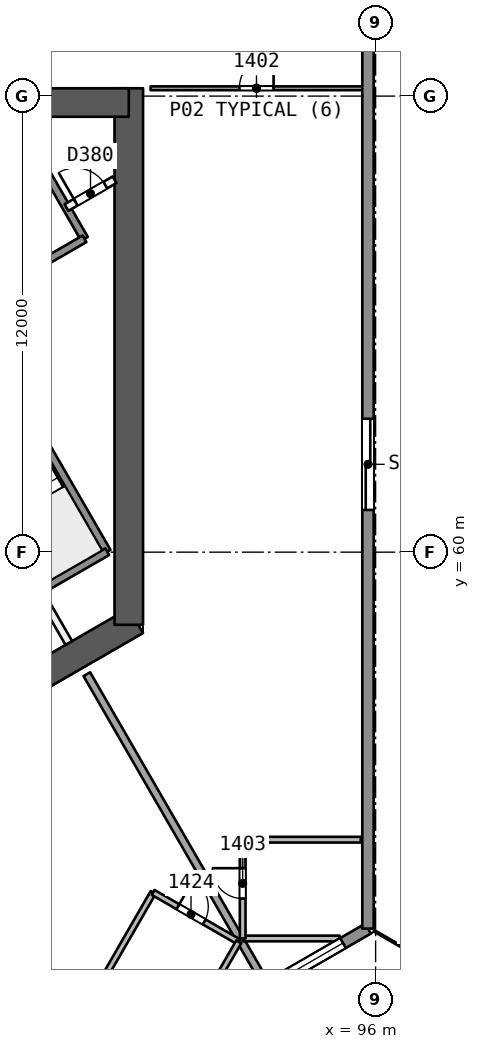
"""IFC4 building model, lengths in metres.
Left out: names, types, materials, properties, quantities, classifications, styles, units other than length and angle.
Written with IfcOpenShell. Run it as: python <this file> out.ifc"""

import sys

from ifc_helpers import new_model, si_unit, direction, frame, frame_2d, origin, place, context, subcontext, project, spatial, rectangle, extrude, element, fill, save


model = new_model("IFC4")
c1 = context("Model", 3, precision=1e-05, world=origin(), true_north=direction((0.0, 1.0)))
c2 = subcontext(c1, "Body", "Model", "MODEL_VIEW")
j1 = project(units=[si_unit("LENGTHUNIT", "METRE"), si_unit("PLANEANGLEUNIT", "RADIAN")], contexts=[c1])
p1 = place(None, origin())
s1 = spatial("IfcSite", under=j1, at=p1, CompositionType="ELEMENT")
p2 = place(p1, origin())
s2 = spatial("IfcBuilding", under=s1, at=p2, CompositionType="ELEMENT")
p3 = place(p2, frame((0.0, 0.0, 64.7)))
s3 = spatial("IfcBuildingStorey", under=s2, at=p3, CompositionType="ELEMENT", Elevation=64.7)
p4 = place(p3, frame((86.723, 56.483, 0.0), z_axis=(0.0, 0.0, 1.0), x_axis=(0.866017201164, 0.500014207086, 0.0)))
e1 = element("IfcWall", 1, at=p4, inside=s3, PredefinedType="SHEAR", context=c2, shape_type="SweptSolid", body=[
    extrude(rectangle(XDim=3.429, YDim=0.75, at=frame_2d((1.714, 0.0))), origin(), (0.0, 0.0, 1.0), 3.7),
])
p5 = place(p3, frame((89.505, 58.089, 0.0), z_axis=(0.0, 0.0, 1.0), x_axis=(0.0, 1.0, 0.0)))
e2 = element("IfcWall", 2, at=p5, inside=s3, PredefinedType="SHEAR", context=c2, shape_type="SweptSolid", body=[
    extrude(rectangle(XDim=14.117, YDim=0.75, at=frame_2d((7.059, 0.0))), origin(), (0.0, 0.0, 1.0), 3.7),
])
p6 = place(p3, frame((89.505, 71.831, 0.0), z_axis=(0.0, 0.0, 1.0), x_axis=(-1.0, 0.0, 0.0)))
e3 = element("IfcWall", 3, at=p6, inside=s3, PredefinedType="SHEAR", context=c2, shape_type="SweptSolid", body=[
    extrude(rectangle(XDim=10.005, YDim=0.75, at=frame_2d((5.002, 0.0))), origin(), (0.0, 0.0, 1.0), 3.7),
])
p7 = place(p6, frame((7.855, 0.0, 0.0)))
e4 = element("IfcOpeningElement", 4, at=p7, cuts=e3, PredefinedType="OPENING", context=c2, shape_type="SweptSolid", body=[
    extrude(rectangle(XDim=1.2, YDim=2.1, at=frame_2d((0.6, 1.05))), frame((0.0, 0.385, 0.0), z_axis=(0.0, -1.0, 0.0), x_axis=(1.0, 0.0, 0.0)), (0.0, 0.0, 1.0), 0.771),
])
p8 = place(p3, frame((90.079, 72.206, 0.0), z_axis=(0.0, 0.0, 1.0), x_axis=(1.0, 0.0, 0.0)))
e5 = element("IfcWall", 5, at=p8, inside=s3, PredefinedType="PARTITIONING", context=c2, shape_type="SweptSolid", body=[
    extrude(rectangle(XDim=5.571, YDim=0.1, at=frame_2d((2.786, 0.0))), origin(), (0.0, 0.0, 1.0), 3.2),
])
p9 = place(p8, frame((2.336, 0.0, 0.0)))
e6 = element("IfcOpeningElement", 6, at=p9, cuts=e5, PredefinedType="OPENING", context=c2, shape_type="SweptSolid", body=[
    extrude(rectangle(XDim=0.9, YDim=2.1, at=frame_2d((0.45, 1.05))), frame((0.0, 0.061, 0.0), z_axis=(0.0, -1.0, 0.0), x_axis=(1.0, 0.0, 0.0)), (0.0, 0.0, 1.0), 0.121),
])
p10 = place(p3, frame((95.051, 49.835, 0.0), z_axis=(0.0, 0.0, 1.0), x_axis=(-1.0, 0.0, 0.0)))
e7 = element("IfcWall", 7, at=p10, inside=s3, PredefinedType="PARTITIONING", context=c2, shape_type="SweptSolid", body=[
    extrude(rectangle(XDim=2.55, YDim=0.15, at=frame_2d((1.275, 0.0))), origin(), (0.0, 0.0, 1.0), 3.2),
])
p11 = place(p3, frame((92.501, 49.835, 0.0), z_axis=(0.0, 0.0, 1.0), x_axis=(0.0, 1.0, 0.0)))
e8 = element("IfcWall", 8, at=p11, inside=s3, PredefinedType="PARTITIONING", context=c2, shape_type="SweptSolid", body=[
    extrude(rectangle(XDim=2.6, YDim=0.15, at=frame_2d((1.3, 0.0))), origin(), (0.0, 0.0, 1.0), 3.2),
])
p12 = place(p11, frame((1.05, 0.0, 0.0)))
e9 = element("IfcOpeningElement", 9, at=p12, cuts=e8, PredefinedType="OPENING", context=c2, shape_type="SweptSolid", body=[
    extrude(rectangle(XDim=0.8, YDim=2.1, at=frame_2d((0.4, 1.05))), frame((0.0, 0.085, 0.0), z_axis=(0.0, -1.0, 0.0), x_axis=(1.0, 0.0, 0.0)), (0.0, 0.0, 1.0), 0.171),
])
p13 = place(p3, frame((92.501, 52.435, 0.0), z_axis=(0.0, 0.0, 1.0), x_axis=(1.0, 0.0, 0.0)))
e10 = element("IfcWall", 10, at=p13, inside=s3, PredefinedType="PARTITIONING", context=c2, shape_type="SweptSolid", body=[
    extrude(rectangle(XDim=3.108, YDim=0.15, at=frame_2d((1.554, 0.0))), origin(), (0.0, 0.0, 1.0), 3.2),
])
p14 = place(p3, frame((88.401, 56.789, 0.0), z_axis=(0.0, 0.0, 1.0), x_axis=(0.49998471623, -0.866034227694, 0.0)))
e11 = element("IfcWall", 11, at=p14, inside=s3, PredefinedType="PARTITIONING", context=c2, shape_type="SweptSolid", body=[
    extrude(rectangle(XDim=9.347, YDim=0.2, at=frame_2d((4.674, 0.0))), origin(), (0.0, 0.0, 1.0), 3.2),
])
p15 = place(p3, frame((88.593, 48.354, 0.0), z_axis=(0.0, 0.0, 1.0), x_axis=(0.499983108224, 0.866035156036, 0.0)))
e12 = element("IfcWall", 12, at=p15, inside=s3, PredefinedType="PARTITIONING", context=c2, shape_type="SweptSolid", body=[
    extrude(rectangle(XDim=3.108, YDim=0.15, at=frame_2d((1.554, 0.0))), origin(), (0.0, 0.0, 1.0), 3.2),
])
p16 = place(p3, frame((90.146, 51.046, 0.0), z_axis=(0.0, 0.0, 1.0), x_axis=(0.866021400173, -0.500006934395, 0.0)))
e13 = element("IfcWall", 13, at=p16, inside=s3, PredefinedType="PARTITIONING", context=c2, shape_type="SweptSolid", body=[
    extrude(rectangle(XDim=2.6, YDim=0.15, at=frame_2d((1.3, 0.0))), origin(), (0.0, 0.0, 1.0), 3.2),
])
p17 = place(p16, frame((0.75, 0.0, 0.0)))
e14 = element("IfcOpeningElement", 14, at=p17, cuts=e13, PredefinedType="OPENING", context=c2, shape_type="SweptSolid", body=[
    extrude(rectangle(XDim=0.8, YDim=2.1, at=frame_2d((0.4, 1.05))), frame((0.0, 0.085, 0.0), z_axis=(0.0, -1.0, 0.0), x_axis=(1.0, 0.0, 0.0)), (0.0, 0.0, 1.0), 0.171),
])
p18 = place(p3, frame((92.398, 49.746, 0.0), z_axis=(0.0, 0.0, 1.0), x_axis=(-0.500015568388, -0.866016415185, 0.0)))
e15 = element("IfcWall", 15, at=p18, inside=s3, PredefinedType="PARTITIONING", context=c2, shape_type="SweptSolid", body=[
    extrude(rectangle(XDim=2.5, YDim=0.15, at=frame_2d((1.25, 0.0))), origin(), (0.0, 0.0, 1.0), 3.2),
])
p19 = place(p3, frame((95.8, 50.095, 0.0), z_axis=(0.0, 0.0, 1.0), x_axis=(-0.866022842194, -0.500004436779, 0.0)))
e16 = element("IfcWall", 16, at=p19, inside=s3, PredefinedType="SOLIDWALL", context=c2, shape_type="SweptSolid", body=[
    extrude(rectangle(XDim=6.121, YDim=0.3, at=frame_2d((3.06, 0.0))), origin(), (0.0, 0.0, 1.0), 3.2),
])
p20 = place(p19, frame((0.76, 0.0, 0.9)))
e17 = element("IfcOpeningElement", 17, at=p20, cuts=e16, PredefinedType="OPENING", context=c2, shape_type="SweptSolid", body=[
    extrude(rectangle(XDim=1.8, YDim=1.5, at=frame_2d((0.9, 0.75))), frame((0.0, 0.161, 0.0), z_axis=(0.0, -1.0, 0.0), x_axis=(1.0, 0.0, 0.0)), (0.0, 0.0, 1.0), 0.321),
])
p21 = place(p19, frame((3.532, 0.0, 0.9)))
e18 = element("IfcOpeningElement", 18, at=p21, cuts=e16, PredefinedType="OPENING", context=c2, shape_type="SweptSolid", body=[
    extrude(rectangle(XDim=1.8, YDim=1.5, at=frame_2d((0.9, 0.75))), frame((0.0, 0.161, 0.0), z_axis=(0.0, -1.0, 0.0), x_axis=(1.0, 0.0, 0.0)), (0.0, 0.0, 1.0), 0.321),
])
p22 = place(p3, frame((95.8, 109.905, 0.0), z_axis=(0.0, 0.0, 1.0), x_axis=(0.0, -1.0, 0.0)))
e19 = element("IfcWall", 19, at=p22, inside=s3, PredefinedType="SOLIDWALL", context=c2, shape_type="SweptSolid", body=[
    extrude(rectangle(XDim=59.811, YDim=0.3, at=frame_2d((29.905, 0.0))), origin(), (0.0, 0.0, 1.0), 3.2),
])
p23 = place(p22, frame((28.394, 0.0, 0.0)))
e20 = element("IfcOpeningElement", 20, at=p23, cuts=e19, PredefinedType="OPENING", context=c2, shape_type="SweptSolid", body=[
    extrude(rectangle(XDim=2.4, YDim=2.4, at=frame_2d((1.2, 1.2))), frame((0.0, 0.161, 0.0), z_axis=(0.0, -1.0, 0.0), x_axis=(1.0, 0.0, 0.0)), (0.0, 0.0, 1.0), 0.321),
])
p24 = place(p22, frame((34.161, 0.0, 0.0)))
e21 = element("IfcOpeningElement", 21, at=p24, cuts=e19, PredefinedType="OPENING", context=c2, shape_type="SweptSolid", body=[
    extrude(rectangle(XDim=2.4, YDim=2.4, at=frame_2d((1.2, 1.2))), frame((0.0, 0.161, 0.0), z_axis=(0.0, -1.0, 0.0), x_axis=(1.0, 0.0, 0.0)), (0.0, 0.0, 1.0), 0.321),
])
p25 = place(p22, frame((46.394, 0.0, 0.0)))
e22 = element("IfcOpeningElement", 22, at=p25, cuts=e19, PredefinedType="OPENING", context=c2, shape_type="SweptSolid", body=[
    extrude(rectangle(XDim=2.4, YDim=2.4, at=frame_2d((1.2, 1.2))), frame((0.0, 0.161, 0.0), z_axis=(0.0, -1.0, 0.0), x_axis=(1.0, 0.0, 0.0)), (0.0, 0.0, 1.0), 0.321),
])
p26 = place(p22, frame((22.938, 0.0, 0.0)))
e23 = element("IfcOpeningElement", 23, at=p26, cuts=e19, PredefinedType="OPENING", context=c2, shape_type="SweptSolid", body=[
    extrude(rectangle(XDim=2.4, YDim=2.4, at=frame_2d((1.2, 1.2))), frame((0.0, 0.161, 0.0), z_axis=(0.0, -1.0, 0.0), x_axis=(1.0, 0.0, 0.0)), (0.0, 0.0, 1.0), 0.321),
])
p27 = place(p22, frame((11.002, 0.0, 0.0)))
e24 = element("IfcOpeningElement", 24, at=p27, cuts=e19, PredefinedType="OPENING", context=c2, shape_type="SweptSolid", body=[
    extrude(rectangle(XDim=2.4, YDim=2.4, at=frame_2d((1.2, 1.2))), frame((0.0, 0.161, 0.0), z_axis=(0.0, -1.0, 0.0), x_axis=(1.0, 0.0, 0.0)), (0.0, 0.0, 1.0), 0.321),
])
p28 = place(p3, frame((90.499, 47.034, 0.0), z_axis=(0.0, 0.0, 1.0), x_axis=(-0.866026049211, 0.499998882086, 0.0)))
e25 = element("IfcWall", 25, at=p28, inside=s3, PredefinedType="SOLIDWALL", context=c2, shape_type="SweptSolid", body=[
    extrude(rectangle(XDim=59.811, YDim=0.3, at=frame_2d((29.905, 0.0))), origin(), (0.0, 0.0, 1.0), 3.2),
])
p29 = place(p28, frame((28.705, 0.0, 0.0)))
e26 = element("IfcOpeningElement", 26, at=p29, cuts=e25, PredefinedType="OPENING", context=c2, shape_type="SweptSolid", body=[
    extrude(rectangle(XDim=2.4, YDim=2.4, at=frame_2d((1.2, 1.2))), frame((0.0, 0.161, 0.0), z_axis=(0.0, -1.0, 0.0), x_axis=(1.0, 0.0, 0.0)), (0.0, 0.0, 1.0), 0.321),
])
p30 = place(p28, frame((34.161, 0.0, 0.0)))
e27 = element("IfcOpeningElement", 27, at=p30, cuts=e25, PredefinedType="OPENING", context=c2, shape_type="SweptSolid", body=[
    extrude(rectangle(XDim=2.4, YDim=2.4, at=frame_2d((1.2, 1.2))), frame((0.0, 0.161, 0.0), z_axis=(0.0, -1.0, 0.0), x_axis=(1.0, 0.0, 0.0)), (0.0, 0.0, 1.0), 0.321),
])
p31 = place(p28, frame((46.394, 0.0, 0.0)))
e28 = element("IfcOpeningElement", 28, at=p31, cuts=e25, PredefinedType="OPENING", context=c2, shape_type="SweptSolid", body=[
    extrude(rectangle(XDim=2.4, YDim=2.4, at=frame_2d((1.2, 1.2))), frame((0.0, 0.161, 0.0), z_axis=(0.0, -1.0, 0.0), x_axis=(1.0, 0.0, 0.0)), (0.0, 0.0, 1.0), 0.321),
])
p32 = place(p28, frame((23.249, 0.0, 0.0)))
e29 = element("IfcOpeningElement", 29, at=p32, cuts=e25, PredefinedType="OPENING", context=c2, shape_type="SweptSolid", body=[
    extrude(rectangle(XDim=2.4, YDim=2.4, at=frame_2d((1.2, 1.2))), frame((0.0, 0.161, 0.0), z_axis=(0.0, -1.0, 0.0), x_axis=(1.0, 0.0, 0.0)), (0.0, 0.0, 1.0), 0.321),
])
p33 = place(p28, frame((11.002, 0.0, 0.0)))
e30 = element("IfcOpeningElement", 30, at=p33, cuts=e25, PredefinedType="OPENING", context=c2, shape_type="SweptSolid", body=[
    extrude(rectangle(XDim=2.4, YDim=2.4, at=frame_2d((1.2, 1.2))), frame((0.0, 0.161, 0.0), z_axis=(0.0, -1.0, 0.0), x_axis=(1.0, 0.0, 0.0)), (0.0, 0.0, 1.0), 0.321),
])
p34 = place(p3, frame((87.09, 59.06, 0.0), z_axis=(0.0, 0.0, 1.0), x_axis=(0.499937194881, -0.866061661301, 0.0)))
e31 = element("IfcWall", 31, at=p34, inside=s3, PredefinedType="PARTITIONING", context=c2, shape_type="SweptSolid", body=[
    extrude(rectangle(XDim=1.673, YDim=0.2, at=frame_2d((0.836, 0.0))), origin(), (0.0, 0.0, 1.0), 3.2),
])
p35 = place(p3, frame((85.087, 66.679, 0.0), z_axis=(0.0, 0.0, 1.0), x_axis=(0.500019787375, -0.866013979237, 0.0)))
e32 = element("IfcWall", 32, at=p35, inside=s3, PredefinedType="SOLIDWALL", context=c2, shape_type="SweptSolid", body=[
    extrude(rectangle(XDim=7.7, YDim=0.2, at=frame_2d((3.85, 0.0))), origin(), (0.0, 0.0, 1.0), 3.2),
])
p36 = place(p35, frame((0.55, 0.0, 0.0)))
e33 = element("IfcOpeningElement", 33, at=p36, cuts=e32, PredefinedType="OPENING", context=c2, shape_type="SweptSolid", body=[
    extrude(rectangle(XDim=1.1, YDim=2.1, at=frame_2d((0.55, 1.05))), frame((0.0, 0.11, 0.0), z_axis=(0.0, -1.0, 0.0), x_axis=(1.0, 0.0, 0.0)), (0.0, 0.0, 1.0), 0.221),
])
p37 = place(p3, frame((86.965, 70.626, 0.0), z_axis=(0.0, 0.0, 1.0), x_axis=(0.499996545922, -0.866027397988, 0.0)))
e34 = element("IfcWall", 34, at=p37, inside=s3, PredefinedType="SOLIDWALL", context=c2, shape_type="SweptSolid", body=[
    extrude(rectangle(XDim=2.75, YDim=0.2, at=frame_2d((1.375, 0.0))), origin(), (0.0, 0.0, 1.0), 3.2),
])
p38 = place(p3, frame((87.865, 69.068, 0.0), z_axis=(0.0, 0.0, 1.0), x_axis=(0.865982457891, 0.500074377092, 0.0)))
e35 = element("IfcWall", 35, at=p38, inside=s3, PredefinedType="PARTITIONING", context=c2, shape_type="SweptSolid", body=[
    extrude(rectangle(XDim=1.461, YDim=0.2, at=frame_2d((0.73, 0.0))), origin(), (0.0, 0.0, 1.0), 3.2),
])
p39 = place(p38, frame((0.281, 0.0, 0.0)))
e36 = element("IfcOpeningElement", 36, at=p39, cuts=e35, PredefinedType="OPENING", context=c2, shape_type="SweptSolid", body=[
    extrude(rectangle(XDim=0.9, YDim=2.1, at=frame_2d((0.45, 1.05))), frame((0.0, 0.11, 0.0), z_axis=(0.0, -1.0, 0.0), x_axis=(1.0, 0.0, 0.0)), (0.0, 0.0, 1.0), 0.221),
])
p40 = place(p3, frame((86.348, 67.095, 0.0), z_axis=(0.0, 0.0, 1.0), x_axis=(0.86602648383, 0.499998129301, 0.0)))
e37 = element("IfcWall", 37, at=p40, inside=s3, PredefinedType="SOLIDWALL", context=c2, shape_type="SweptSolid", body=[
    extrude(rectangle(XDim=2.3, YDim=0.2, at=frame_2d((1.15, 0.0))), origin(), (0.0, 0.0, 1.0), 3.2),
])
p41 = place(p3, frame((85.343, 57.935, 0.0), z_axis=(0.0, 0.0, 1.0), x_axis=(0.866004344652, 0.500036473714, 0.0)))
e38 = element("IfcWall", 38, at=p41, inside=s3, PredefinedType="SOLIDWALL", context=c2, shape_type="SweptSolid", body=[
    extrude(rectangle(XDim=4.15, YDim=0.2, at=frame_2d((2.075, 0.0))), origin(), (0.0, 0.0, 1.0), 3.2),
])
p42 = place(p9, origin())
e39 = element("IfcDoor", 39, at=p42, inside=s3, OperationType="SINGLE_SWING_RIGHT", PredefinedType="NOTDEFINED", context=c2, shape_type="SweptSolid", body=[
    extrude(rectangle(XDim=0.9, YDim=2.1, at=frame_2d((0.45, 1.05))), frame((0.0, 0.025, 0.0), z_axis=(0.0, -1.0, 0.0), x_axis=(1.0, 0.0, 0.0)), (0.0, 0.0, 1.0), 0.05),
])
fill(e6, e39)
p43 = place(p12, origin())
e40 = element("IfcDoor", 40, at=p43, inside=s3, OperationType="SINGLE_SWING_RIGHT", PredefinedType="NOTDEFINED", context=c2, shape_type="SweptSolid", body=[
    extrude(rectangle(XDim=0.8, YDim=2.1, at=frame_2d((0.4, 1.05))), frame((0.0, 0.025, 0.0), z_axis=(0.0, -1.0, 0.0), x_axis=(1.0, 0.0, 0.0)), (0.0, 0.0, 1.0), 0.05),
])
fill(e9, e40)
p44 = place(p17, origin())
e41 = element("IfcDoor", 41, at=p44, inside=s3, OperationType="SINGLE_SWING_LEFT", PredefinedType="NOTDEFINED", context=c2, shape_type="SweptSolid", body=[
    extrude(rectangle(XDim=0.8, YDim=2.1, at=frame_2d((0.4, 1.05))), frame((0.0, 0.025, 0.0), z_axis=(0.0, -1.0, 0.0), x_axis=(1.0, 0.0, 0.0)), (0.0, 0.0, 1.0), 0.05),
])
fill(e14, e41)
p45 = place(p20, origin())
e42 = element("IfcWindow", 42, at=p45, inside=s3, PartitioningType="SINGLE_PANEL", PredefinedType="WINDOW", context=c2, shape_type="SweptSolid", body=[
    extrude(rectangle(XDim=1.8, YDim=1.5, at=frame_2d((0.9, 0.75))), frame((0.0, 0.03, 0.0), z_axis=(0.0, -1.0, 0.0), x_axis=(1.0, 0.0, 0.0)), (0.0, 0.0, 1.0), 0.06),
])
fill(e17, e42)
p46 = place(p25, origin())
e43 = element("IfcDoor", 43, at=p46, inside=s3, OperationType="SLIDING_TO_LEFT", PredefinedType="NOTDEFINED", context=c2, shape_type="SweptSolid", body=[
    extrude(rectangle(XDim=2.4, YDim=2.4, at=frame_2d((1.2, 1.2))), frame((0.0, 0.025, 0.0), z_axis=(0.0, -1.0, 0.0), x_axis=(1.0, 0.0, 0.0)), (0.0, 0.0, 1.0), 0.05),
])
fill(e22, e43)
p47 = place(p39, origin())
e44 = element("IfcDoor", 44, at=p47, inside=s3, OperationType="SINGLE_SWING_LEFT", PredefinedType="NOTDEFINED", context=c2, shape_type="SweptSolid", body=[
    extrude(rectangle(XDim=0.9, YDim=2.1, at=frame_2d((0.45, 1.05))), frame((0.0, 0.025, 0.0), z_axis=(0.0, -1.0, 0.0), x_axis=(1.0, 0.0, 0.0)), (0.0, 0.0, 1.0), 0.05),
])
fill(e36, e44)
save(model, sys.argv[1])
